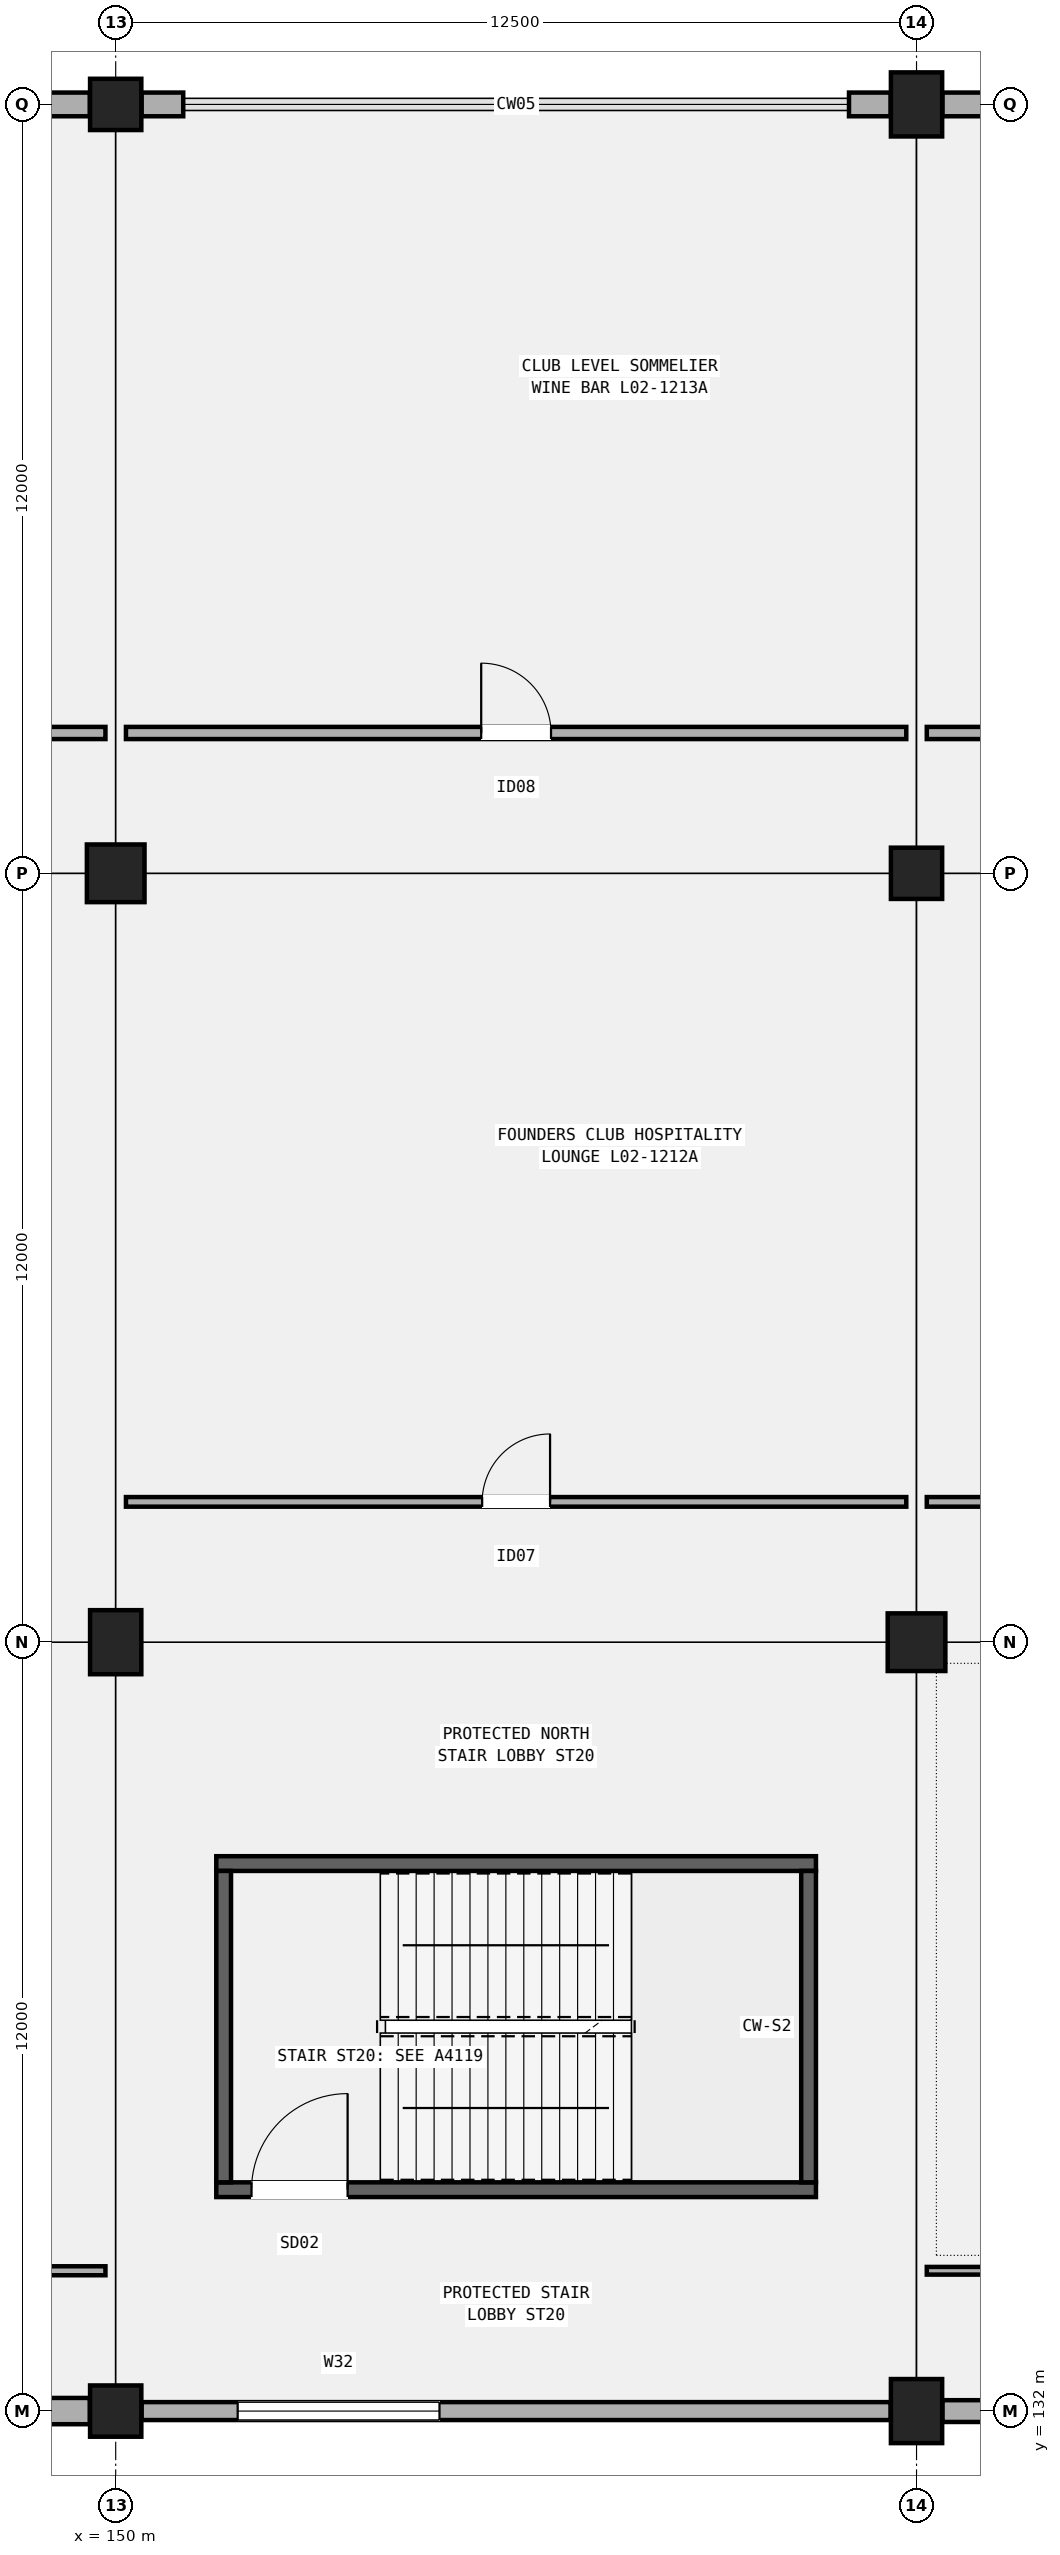
"""IFC4 building model, lengths in metres.
Left out: names, types, materials, properties, quantities, classifications, styles, units other than length and angle.
Written with IfcOpenShell. Run it as: python <this file> out.ifc"""

import sys

from ifc_helpers import new_model, si_unit, direction, frame, frame_2d, origin, origin_2d, place, context, subcontext, project, spatial, rectangle, extrude, element, fill, save


model = new_model("IFC4")
c1 = context("Model", 3, precision=1e-05, world=origin(), true_north=direction((0.0, 1.0)))
c2 = subcontext(c1, "Body", "Model", "MODEL_VIEW")
j1 = project(units=[si_unit("LENGTHUNIT", "METRE"), si_unit("PLANEANGLEUNIT", "RADIAN")], contexts=[c1])
p1 = place(None, origin())
s1 = spatial("IfcSite", under=j1, at=p1, CompositionType="ELEMENT")
p2 = place(p1, origin())
s2 = spatial("IfcBuilding", under=s1, at=p2, CompositionType="ELEMENT")
p3 = place(p2, frame((0.0, 0.0, 10.2)))
s3 = spatial("IfcBuildingStorey", under=s2, at=p3, CompositionType="ELEMENT", Elevation=10.2)
p4 = place(p3, frame((150.0, 132.0, 0.0), z_axis=(0.0, 0.0, 1.0), x_axis=(1.0, 0.0, 0.0)))
e1 = element("IfcColumn", 1, at=p4, inside=s3, PredefinedType="COLUMN", context=c2, shape_type="SweptSolid", body=[
    extrude(rectangle(XDim=0.8, YDim=0.8, at=origin_2d()), origin(), (0.0, 0.0, 1.0), 5.1),
])
p5 = place(p3, frame((150.0, 144.0, 0.0), z_axis=(0.0, 0.0, 1.0), x_axis=(1.0, 0.0, 0.0)))
e2 = element("IfcColumn", 2, at=p5, inside=s3, PredefinedType="COLUMN", context=c2, shape_type="SweptSolid", body=[
    extrude(rectangle(XDim=0.8, YDim=1.0, at=origin_2d()), origin(), (0.0, 0.0, 1.0), 5.1),
])
p6 = place(p3, frame((150.0, 156.0, 0.0), z_axis=(0.0, 0.0, 1.0), x_axis=(1.0, 0.0, 0.0)))
e3 = element("IfcColumn", 3, at=p6, inside=s3, PredefinedType="COLUMN", context=c2, shape_type="SweptSolid", body=[
    extrude(rectangle(XDim=0.9, YDim=0.9, at=origin_2d()), origin(), (0.0, 0.0, 1.0), 5.1),
])
p7 = place(p3, frame((150.0, 168.0, 0.0), z_axis=(0.0, 0.0, 1.0), x_axis=(1.0, 0.0, 0.0)))
e4 = element("IfcColumn", 4, at=p7, inside=s3, PredefinedType="COLUMN", context=c2, shape_type="SweptSolid", body=[
    extrude(rectangle(XDim=0.8, YDim=0.8, at=origin_2d()), origin(), (0.0, 0.0, 1.0), 5.1),
])
p8 = place(p3, frame((162.5, 132.0, 0.0), z_axis=(0.0, 0.0, 1.0), x_axis=(1.0, 0.0, 0.0)))
e5 = element("IfcColumn", 5, at=p8, inside=s3, PredefinedType="COLUMN", context=c2, shape_type="SweptSolid", body=[
    extrude(rectangle(XDim=0.8, YDim=1.0, at=origin_2d()), origin(), (0.0, 0.0, 1.0), 5.1),
])
p9 = place(p3, frame((162.5, 144.0, 0.0), z_axis=(0.0, 0.0, 1.0), x_axis=(1.0, 0.0, 0.0)))
e6 = element("IfcColumn", 6, at=p9, inside=s3, PredefinedType="COLUMN", context=c2, shape_type="SweptSolid", body=[
    extrude(rectangle(XDim=0.9, YDim=0.9, at=origin_2d()), origin(), (0.0, 0.0, 1.0), 5.1),
])
p10 = place(p3, frame((162.5, 156.0, 0.0), z_axis=(0.0, 0.0, 1.0), x_axis=(1.0, 0.0, 0.0)))
e7 = element("IfcColumn", 7, at=p10, inside=s3, PredefinedType="COLUMN", context=c2, shape_type="SweptSolid", body=[
    extrude(rectangle(XDim=0.8, YDim=0.8, at=origin_2d()), origin(), (0.0, 0.0, 1.0), 5.1),
])
p11 = place(p3, frame((162.5, 168.0, 0.0), z_axis=(0.0, 0.0, 1.0), x_axis=(1.0, 0.0, 0.0)))
e8 = element("IfcColumn", 8, at=p11, inside=s3, PredefinedType="COLUMN", context=c2, shape_type="SweptSolid", body=[
    extrude(rectangle(XDim=0.8, YDim=1.0, at=origin_2d()), origin(), (0.0, 0.0, 1.0), 5.1),
])
p12 = place(p3, frame((137.954, 132.0, 0.0), z_axis=(0.0, 0.0, 1.0), x_axis=(1.0, 0.0, 0.0)))
e9 = element("IfcWall", 9, at=p12, inside=s3, PredefinedType="SOLIDWALL", context=c2, shape_type="SweptSolid", body=[
    extrude(rectangle(XDim=11.642, YDim=0.41, at=frame_2d((5.821, 0.0))), origin(), (0.0, 0.0, 1.0), 4.12),
])
p13 = place(p12, frame((1.5, 0.0, 0.95)))
e10 = element("IfcOpeningElement", 10, at=p13, cuts=e9, PredefinedType="OPENING", context=c2, shape_type="SweptSolid", body=[
    extrude(rectangle(XDim=3.0, YDim=1.7, at=frame_2d((1.5, 0.85))), frame((0.0, 0.215, 0.0), z_axis=(0.0, -1.0, 0.0), x_axis=(1.0, 0.0, 0.0)), (0.0, 0.0, 1.0), 0.43),
])
p14 = place(p3, frame((148.946, 168.0, 0.0), z_axis=(0.0, 0.0, 1.0), x_axis=(1.0, 0.0, 0.0)))
e11 = element("IfcWall", 11, at=p14, inside=s3, PredefinedType="SOLIDWALL", context=c2, shape_type="SweptSolid", body=[
    extrude(rectangle(XDim=0.65, YDim=0.37, at=frame_2d((0.325, 0.0))), origin(), (0.0, 0.0, 1.0), 4.12),
])
p15 = place(p3, frame((150.404, 132.0, 0.0), z_axis=(0.0, 0.0, 1.0), x_axis=(1.0, 0.0, 0.0)))
e12 = element("IfcWall", 12, at=p15, inside=s3, PredefinedType="SOLIDWALL", context=c2, shape_type="SweptSolid", body=[
    extrude(rectangle(XDim=11.692, YDim=0.28, at=frame_2d((5.846, 0.0))), origin(), (0.0, 0.0, 1.0), 4.22),
])
p16 = place(p15, frame((1.5, 0.0, 0.95)))
e13 = element("IfcOpeningElement", 13, at=p16, cuts=e12, PredefinedType="OPENING", context=c2, shape_type="SweptSolid", body=[
    extrude(rectangle(XDim=3.15, YDim=1.9, at=frame_2d((1.575, 0.95))), frame((0.0, 0.15, 0.0), z_axis=(0.0, -1.0, 0.0), x_axis=(1.0, 0.0, 0.0)), (0.0, 0.0, 1.0), 0.3),
])
for number, where, z_axis, x_axis in (
    (14, (150.404, 168.0, 0.0), (0.0, 0.0, 1.0), (1.0, 0.0, 0.0)),
    (15, (161.446, 168.0, 0.0), (0.0, 0.0, 1.0), (1.0, 0.0, 0.0)),
):
    element("IfcWall", number, at=place(p3, frame(where, z_axis=z_axis, x_axis=x_axis)), inside=s3, PredefinedType="SOLIDWALL", context=c2, shape_type="SweptSolid", body=[
        extrude(rectangle(XDim=0.65, YDim=0.37, at=frame_2d((0.325, 0.0))), origin(), (0.0, 0.0, 1.0), 4.22),
    ])
p17 = place(p3, frame((162.904, 132.0, 0.0), z_axis=(0.0, 0.0, 1.0), x_axis=(1.0, 0.0, 0.0)))
e16 = element("IfcWall", 16, at=p17, inside=s3, PredefinedType="SOLIDWALL", context=c2, shape_type="SweptSolid", body=[
    extrude(rectangle(XDim=11.642, YDim=0.34, at=frame_2d((5.821, 0.0))), origin(), (0.0, 0.0, 1.0), 4.02),
])
p18 = place(p17, frame((1.5, 0.0, 0.95)))
e17 = element("IfcOpeningElement", 17, at=p18, cuts=e16, PredefinedType="OPENING", context=c2, shape_type="SweptSolid", body=[
    extrude(rectangle(XDim=3.3, YDim=2.25, at=frame_2d((1.65, 1.125))), frame((0.0, 0.18, 0.0), z_axis=(0.0, -1.0, 0.0), x_axis=(1.0, 0.0, 0.0)), (0.0, 0.0, 1.0), 0.36),
])
p19 = place(p3, frame((162.904, 168.0, 0.0), z_axis=(0.0, 0.0, 1.0), x_axis=(1.0, 0.0, 0.0)))
e18 = element("IfcWall", 18, at=p19, inside=s3, PredefinedType="SOLIDWALL", context=c2, shape_type="SweptSolid", body=[
    extrude(rectangle(XDim=0.65, YDim=0.37, at=frame_2d((0.325, 0.0))), origin(), (0.0, 0.0, 1.0), 4.02),
])
p20 = place(p3, frame((151.57, 135.455, 0.0), z_axis=(0.0, 0.0, 1.0), x_axis=(1.0, 0.0, 0.0)))
e19 = element("IfcWall", 19, at=p20, inside=s3, PredefinedType="SHEAR", context=c2, shape_type="SweptSolid", body=[
    extrude(rectangle(XDim=9.36, YDim=0.23, at=frame_2d((4.68, 0.0))), origin(), (0.0, 0.0, 1.0), 4.82),
])
p21 = place(p20, frame((0.55, 0.0, 0.0)))
e20 = element("IfcOpeningElement", 20, at=p21, cuts=e19, PredefinedType="OPENING", context=c2, shape_type="SweptSolid", body=[
    extrude(rectangle(XDim=1.5, YDim=2.2, at=frame_2d((0.75, 1.1))), frame((0.0, 0.125, 0.0), z_axis=(0.0, -1.0, 0.0), x_axis=(1.0, 0.0, 0.0)), (0.0, 0.0, 1.0), 0.25),
])
p22 = place(p3, frame((151.57, 140.545, 0.0), z_axis=(0.0, 0.0, 1.0), x_axis=(1.0, 0.0, 0.0)))
e21 = element("IfcWall", 21, at=p22, inside=s3, PredefinedType="SHEAR", context=c2, shape_type="SweptSolid", body=[
    extrude(rectangle(XDim=9.36, YDim=0.23, at=frame_2d((4.68, 0.0))), origin(), (0.0, 0.0, 1.0), 4.82),
])
for number, where, z_axis, x_axis in (
    (22, (151.685, 135.57, 0.0), (0.0, 0.0, 1.0), (0.0, 1.0, 0.0)),
    (23, (160.815, 135.57, 0.0), (0.0, 0.0, 1.0), (0.0, 1.0, 0.0)),
):
    element("IfcWall", number, at=place(p3, frame(where, z_axis=z_axis, x_axis=x_axis)), inside=s3, PredefinedType="SHEAR", context=c2, shape_type="SweptSolid", body=[
        extrude(rectangle(XDim=4.86, YDim=0.23, at=frame_2d((2.43, 0.0))), origin(), (0.0, 0.0, 1.0), 4.82),
    ])
p23 = place(p3, frame((139.62, 134.19, 0.0), z_axis=(0.0, 0.0, 1.0), x_axis=(1.0, 0.0, 0.0)))
e24 = element("IfcWall", 24, at=p23, inside=s3, PredefinedType="PARTITIONING", context=c2, shape_type="SweptSolid", body=[
    extrude(rectangle(XDim=10.22, YDim=0.14, at=frame_2d((5.11, 0.0))), origin(), (0.0, 0.0, 1.0), 4.22),
])
p24 = place(p23, frame((4.62, 0.0, 0.0)))
e25 = element("IfcOpeningElement", 25, at=p24, cuts=e24, PredefinedType="OPENING", context=c2, shape_type="SweptSolid", body=[
    extrude(rectangle(XDim=0.98, YDim=2.1, at=frame_2d((0.49, 1.05))), frame((0.0, 0.08, 0.0), z_axis=(0.0, -1.0, 0.0), x_axis=(1.0, 0.0, 0.0)), (0.0, 0.0, 1.0), 0.16),
])
p25 = place(p3, frame((139.62, 158.19, 0.0), z_axis=(0.0, 0.0, 1.0), x_axis=(1.0, 0.0, 0.0)))
e26 = element("IfcWall", 26, at=p25, inside=s3, PredefinedType="PARTITIONING", context=c2, shape_type="SweptSolid", body=[
    extrude(rectangle(XDim=10.22, YDim=0.19, at=frame_2d((5.11, 0.0))), origin(), (0.0, 0.0, 1.0), 4.22),
])
p26 = place(p25, frame((4.61, 0.0, 0.0)))
e27 = element("IfcOpeningElement", 27, at=p26, cuts=e26, PredefinedType="OPENING", context=c2, shape_type="SweptSolid", body=[
    extrude(rectangle(XDim=1.0, YDim=2.14, at=frame_2d((0.5, 1.07))), frame((0.0, 0.105, 0.0), z_axis=(0.0, -1.0, 0.0), x_axis=(1.0, 0.0, 0.0)), (0.0, 0.0, 1.0), 0.21),
])
p27 = place(p3, frame((150.16, 146.19, 0.0), z_axis=(0.0, 0.0, 1.0), x_axis=(1.0, 0.0, 0.0)))
e28 = element("IfcWall", 28, at=p27, inside=s3, PredefinedType="PARTITIONING", context=c2, shape_type="SweptSolid", body=[
    extrude(rectangle(XDim=12.18, YDim=0.15, at=frame_2d((6.09, 0.0))), origin(), (0.0, 0.0, 1.0), 4.22),
])
p28 = place(p27, frame((5.56, 0.0, 0.0)))
e29 = element("IfcOpeningElement", 29, at=p28, cuts=e28, PredefinedType="OPENING", context=c2, shape_type="SweptSolid", body=[
    extrude(rectangle(XDim=1.06, YDim=2.15, at=frame_2d((0.53, 1.075))), frame((0.0, 0.085, 0.0), z_axis=(0.0, -1.0, 0.0), x_axis=(1.0, 0.0, 0.0)), (0.0, 0.0, 1.0), 0.17),
])
p29 = place(p3, frame((150.16, 158.19, 0.0), z_axis=(0.0, 0.0, 1.0), x_axis=(1.0, 0.0, 0.0)))
e30 = element("IfcWall", 30, at=p29, inside=s3, PredefinedType="PARTITIONING", context=c2, shape_type="SweptSolid", body=[
    extrude(rectangle(XDim=12.18, YDim=0.19, at=frame_2d((6.09, 0.0))), origin(), (0.0, 0.0, 1.0), 4.22),
])
p30 = place(p29, frame((5.545, 0.0, 0.0)))
e31 = element("IfcOpeningElement", 31, at=p30, cuts=e30, PredefinedType="OPENING", context=c2, shape_type="SweptSolid", body=[
    extrude(rectangle(XDim=1.09, YDim=2.16, at=frame_2d((0.545, 1.08))), frame((0.0, 0.105, 0.0), z_axis=(0.0, -1.0, 0.0), x_axis=(1.0, 0.0, 0.0)), (0.0, 0.0, 1.0), 0.21),
])
p31 = place(p3, frame((162.66, 134.19, 0.0), z_axis=(0.0, 0.0, 1.0), x_axis=(1.0, 0.0, 0.0)))
e32 = element("IfcWall", 32, at=p31, inside=s3, PredefinedType="PARTITIONING", context=c2, shape_type="SweptSolid", body=[
    extrude(rectangle(XDim=12.18, YDim=0.12, at=frame_2d((6.09, 0.0))), origin(), (0.0, 0.0, 1.0), 4.22),
])
p32 = place(p31, frame((5.47, 0.0, 0.0)))
e33 = element("IfcOpeningElement", 33, at=p32, cuts=e32, PredefinedType="OPENING", context=c2, shape_type="SweptSolid", body=[
    extrude(rectangle(XDim=1.24, YDim=2.22, at=frame_2d((0.62, 1.11))), frame((0.0, 0.07, 0.0), z_axis=(0.0, -1.0, 0.0), x_axis=(1.0, 0.0, 0.0)), (0.0, 0.0, 1.0), 0.14),
])
p33 = place(p3, frame((162.66, 146.19, 0.0), z_axis=(0.0, 0.0, 1.0), x_axis=(1.0, 0.0, 0.0)))
e34 = element("IfcWall", 34, at=p33, inside=s3, PredefinedType="PARTITIONING", context=c2, shape_type="SweptSolid", body=[
    extrude(rectangle(XDim=12.18, YDim=0.15, at=frame_2d((6.09, 0.0))), origin(), (0.0, 0.0, 1.0), 4.22),
])
p34 = place(p33, frame((5.455, 0.0, 0.0)))
e35 = element("IfcOpeningElement", 35, at=p34, cuts=e34, PredefinedType="OPENING", context=c2, shape_type="SweptSolid", body=[
    extrude(rectangle(XDim=1.27, YDim=2.2, at=frame_2d((0.635, 1.1))), frame((0.0, 0.085, 0.0), z_axis=(0.0, -1.0, 0.0), x_axis=(1.0, 0.0, 0.0)), (0.0, 0.0, 1.0), 0.17),
])
p35 = place(p3, frame((162.66, 158.19, 0.0), z_axis=(0.0, 0.0, 1.0), x_axis=(1.0, 0.0, 0.0)))
e36 = element("IfcWall", 36, at=p35, inside=s3, PredefinedType="PARTITIONING", context=c2, shape_type="SweptSolid", body=[
    extrude(rectangle(XDim=12.198, YDim=0.19, at=frame_2d((6.099, 0.0))), origin(), (0.0, 0.0, 1.0), 4.22),
])
p36 = place(p35, frame((5.44, 0.0, 0.0)))
e37 = element("IfcOpeningElement", 37, at=p36, cuts=e36, PredefinedType="OPENING", context=c2, shape_type="SweptSolid", body=[
    extrude(rectangle(XDim=1.3, YDim=2.24, at=frame_2d((0.65, 1.12))), frame((0.0, 0.105, 0.0), z_axis=(0.0, -1.0, 0.0), x_axis=(1.0, 0.0, 0.0)), (0.0, 0.0, 1.0), 0.21),
])
p37 = place(p16, origin())
e38 = element("IfcWindow", 38, at=p37, inside=s3, PartitioningType="SINGLE_PANEL", PredefinedType="WINDOW", context=c2, shape_type="SweptSolid", body=[
    extrude(rectangle(XDim=3.15, YDim=1.9, at=frame_2d((1.575, 0.95))), frame((0.0, 0.03, 0.0), z_axis=(0.0, -1.0, 0.0), x_axis=(1.0, 0.0, 0.0)), (0.0, 0.0, 1.0), 0.06),
])
fill(e13, e38)
p38 = place(p21, origin())
e39 = element("IfcDoor", 39, at=p38, inside=s3, OperationType="SINGLE_SWING_RIGHT", PredefinedType="DOOR", context=c2, shape_type="SweptSolid", body=[
    extrude(rectangle(XDim=1.5, YDim=2.2, at=frame_2d((0.75, 1.1))), frame((0.0, 0.025, 0.0), z_axis=(0.0, -1.0, 0.0), x_axis=(1.0, 0.0, 0.0)), (0.0, 0.0, 1.0), 0.05),
])
fill(e20, e39)
p39 = place(p28, origin())
e40 = element("IfcDoor", 40, at=p39, inside=s3, OperationType="SINGLE_SWING_RIGHT", PredefinedType="DOOR", context=c2, shape_type="SweptSolid", body=[
    extrude(rectangle(XDim=1.06, YDim=2.15, at=frame_2d((0.53, 1.075))), frame((0.0, 0.025, 0.0), z_axis=(0.0, -1.0, 0.0), x_axis=(1.0, 0.0, 0.0)), (0.0, 0.0, 1.0), 0.05),
])
fill(e29, e40)
p40 = place(p30, origin())
e41 = element("IfcDoor", 41, at=p40, inside=s3, OperationType="SINGLE_SWING_LEFT", PredefinedType="DOOR", context=c2, shape_type="SweptSolid", body=[
    extrude(rectangle(XDim=1.09, YDim=2.16, at=frame_2d((0.545, 1.08))), frame((0.0, 0.025, 0.0), z_axis=(0.0, -1.0, 0.0), x_axis=(1.0, 0.0, 0.0)), (0.0, 0.0, 1.0), 0.05),
])
fill(e31, e41)
save(model, sys.argv[1])
